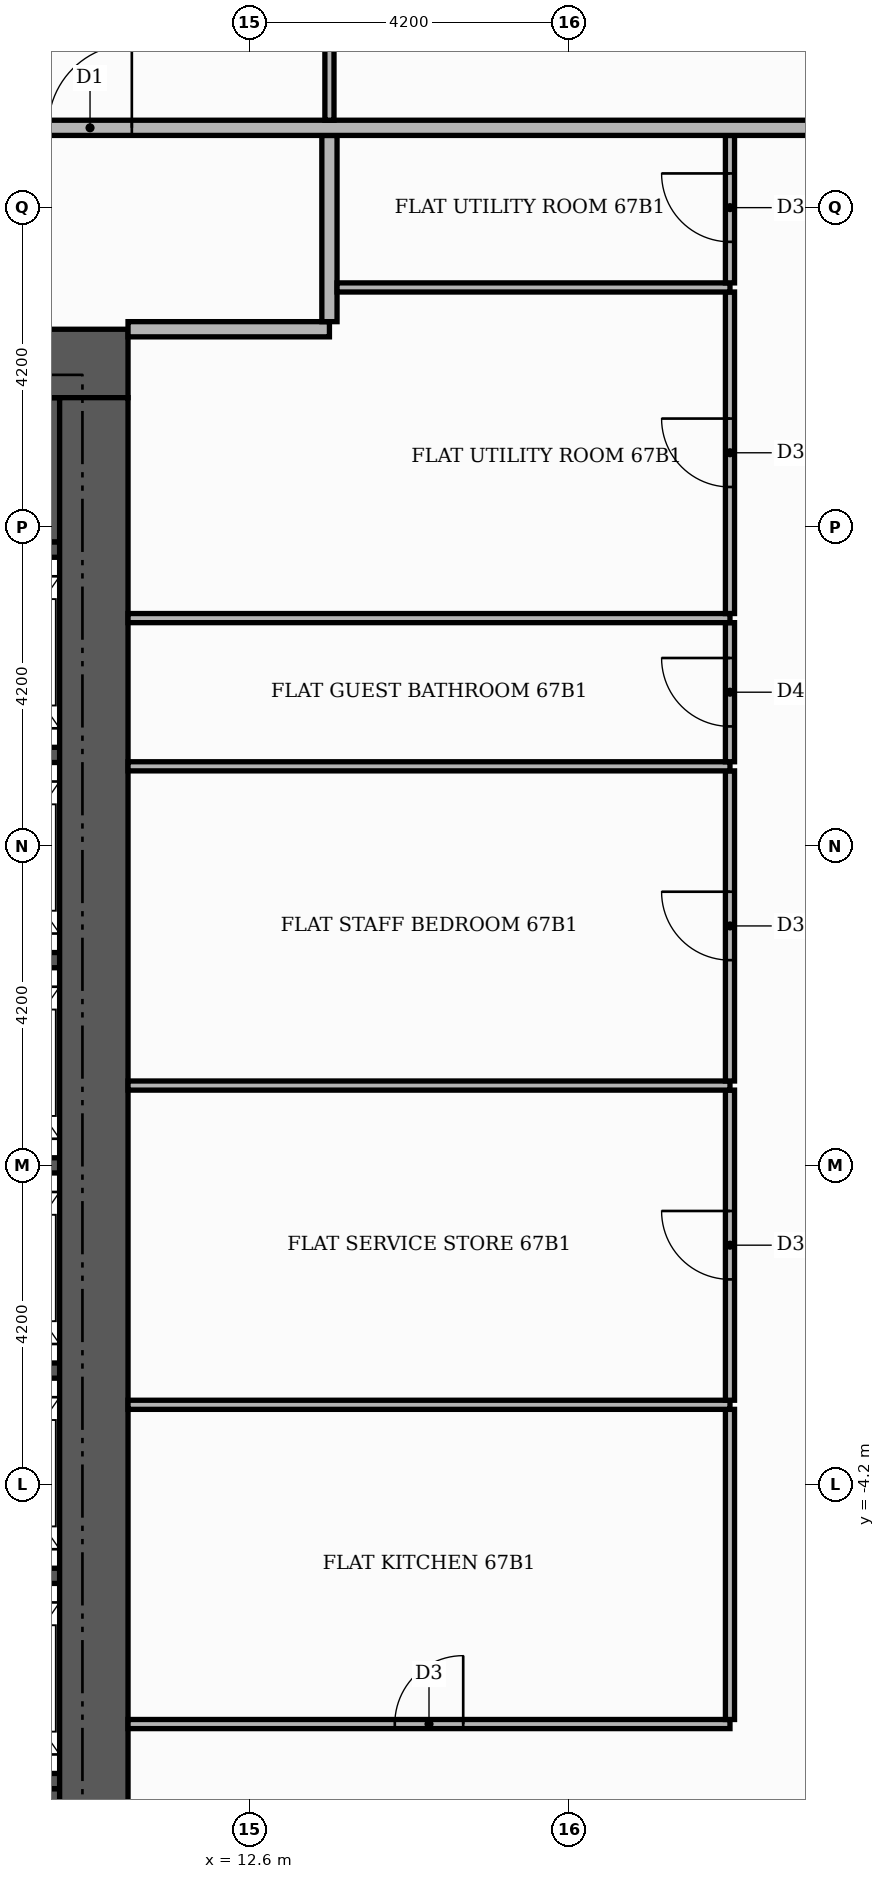
"""IFC4 building model, lengths in metres.
Left out: names, types, materials, properties, quantities, classifications, styles, units other than length and angle.
Written with IfcOpenShell. Run it as: python <this file> out.ifc"""

import sys

from ifc_helpers import new_model, si_unit, direction, frame, frame_2d, origin, place, context, subcontext, project, spatial, rectangle, extrude, element, fill, save


model = new_model("IFC4")
c1 = context("Model", 3, precision=1e-05, world=origin(), true_north=direction((0.0, 1.0)))
c2 = subcontext(c1, "Body", "Model", "MODEL_VIEW")
j1 = project(units=[si_unit("LENGTHUNIT", "METRE"), si_unit("PLANEANGLEUNIT", "RADIAN")], contexts=[c1])
p1 = place(None, origin())
s1 = spatial("IfcSite", under=j1, at=p1, CompositionType="ELEMENT")
p2 = place(p1, origin())
s2 = spatial("IfcBuilding", under=s1, at=p2, CompositionType="ELEMENT")
p3 = place(p2, frame((0.0, 0.0, 279.6)))
s3 = spatial("IfcBuildingStorey", under=s2, at=p3, CompositionType="ELEMENT", Elevation=279.6)
for number, where, z_axis, x_axis in (
    (1, (5.5, -9.15, 0.0), (0.0, 0.0, 1.0), (1.0, 0.0, 0.0)),
    (2, (5.5, 9.15, 0.0), (0.0, 0.0, 1.0), (1.0, 0.0, 0.0)),
):
    element("IfcWall", number, at=place(p3, frame(where, z_axis=z_axis, x_axis=x_axis)), inside=s3, PredefinedType="SHEAR", context=c2, shape_type="SweptSolid", body=[
        extrude(rectangle(XDim=4.6, YDim=1.9, at=frame_2d((2.3, 0.0))), origin(), (0.0, 0.0, 1.0), 3.48),
    ])
for number, where, z_axis, x_axis in (
    (3, (8.1, -8.1, 0.0), (0.0, 0.0, 1.0), (1.0, 0.0, 0.0)),
    (4, (8.1, -5.4, 0.0), (0.0, 0.0, 1.0), (1.0, 0.0, 0.0)),
    (5, (8.1, -2.7, 0.0), (0.0, 0.0, 1.0), (1.0, 0.0, 0.0)),
    (6, (8.1, 0.0, 0.0), (0.0, 0.0, 1.0), (1.0, 0.0, 0.0)),
    (7, (8.1, 2.7, 0.0), (0.0, 0.0, 1.0), (1.0, 0.0, 0.0)),
    (8, (8.1, 5.4, 0.0), (0.0, 0.0, 1.0), (1.0, 0.0, 0.0)),
    (9, (8.1, 8.1, 0.0), (0.0, 0.0, 1.0), (1.0, 0.0, 0.0)),
):
    element("IfcWall", number, at=place(p3, frame(where, z_axis=z_axis, x_axis=x_axis)), inside=s3, PredefinedType="SHEAR", context=c2, shape_type="SweptSolid", body=[
        extrude(rectangle(XDim=2.0, YDim=0.2, at=frame_2d((1.0, 0.0))), origin(), (0.0, 0.0, 1.0), 3.48),
    ])
p4 = place(p3, frame((-11.0, 10.55, 0.0), z_axis=(0.0, 0.0, 1.0), x_axis=(1.0, 0.0, 0.0)))
e10 = element("IfcWall", 10, at=p4, inside=s3, PredefinedType="SHEAR", context=c2, shape_type="SweptSolid", body=[
    extrude(rectangle(XDim=22.0, YDim=0.9, at=frame_2d((11.0, 0.0))), origin(), (0.0, 0.0, 1.0), 3.48),
])
p5 = place(p4, frame((13.3, 0.0, 0.0)))
e11 = element("IfcOpeningElement", 11, at=p5, cuts=e10, PredefinedType="OPENING", context=c2, shape_type="SweptSolid", body=[
    extrude(rectangle(XDim=1.8, YDim=2.2, at=frame_2d((0.9, 1.1))), frame((0.0, 0.46, 0.0), z_axis=(0.0, -1.0, 0.0), x_axis=(1.0, 0.0, 0.0)), (0.0, 0.0, 1.0), 0.92),
])
p6 = place(p3, frame((10.55, -10.1, 0.0), z_axis=(0.0, 0.0, 1.0), x_axis=(0.0, 1.0, 0.0)))
e12 = element("IfcWall", 12, at=p6, inside=s3, PredefinedType="SHEAR", context=c2, shape_type="SweptSolid", body=[
    extrude(rectangle(XDim=20.2, YDim=0.9, at=frame_2d((10.1, 0.0))), origin(), (0.0, 0.0, 1.0), 3.48),
])
p7 = place(p3, frame((11.0, -7.35, 0.0), z_axis=(0.0, 0.0, 1.0), x_axis=(1.0, 0.0, 0.0)))
e13 = element("IfcWall", 13, at=p7, inside=s3, PredefinedType="PARTITIONING", context=c2, shape_type="SweptSolid", body=[
    extrude(rectangle(XDim=7.92, YDim=0.12, at=frame_2d((3.96, 0.0))), origin(), (0.0, 0.0, 1.0), 3.48),
])
p8 = place(p7, frame((3.51, 0.0, 0.0)))
e14 = element("IfcOpeningElement", 14, at=p8, cuts=e13, PredefinedType="OPENING", context=c2, shape_type="SweptSolid", body=[
    extrude(rectangle(XDim=0.9, YDim=2.1, at=frame_2d((0.45, 1.05))), frame((0.0, 0.07, 0.0), z_axis=(0.0, -1.0, 0.0), x_axis=(1.0, 0.0, 0.0)), (0.0, 0.0, 1.0), 0.14),
])
p9 = place(p3, frame((18.92, -7.29, 0.0), z_axis=(0.0, 0.0, 1.0), x_axis=(0.0, 1.0, 0.0)))
e15 = element("IfcWall", 15, at=p9, inside=s3, PredefinedType="PARTITIONING", context=c2, shape_type="SweptSolid", body=[
    extrude(rectangle(XDim=4.08, YDim=0.12, at=frame_2d((2.04, 0.0))), origin(), (0.0, 0.0, 1.0), 3.48),
])
p10 = place(p3, frame((11.0, -3.15, 0.0), z_axis=(0.0, 0.0, 1.0), x_axis=(1.0, 0.0, 0.0)))
e16 = element("IfcWall", 16, at=p10, inside=s3, PredefinedType="PARTITIONING", context=c2, shape_type="SweptSolid", body=[
    extrude(rectangle(XDim=7.92, YDim=0.12, at=frame_2d((3.96, 0.0))), origin(), (0.0, 0.0, 1.0), 3.48),
])
p11 = place(p3, frame((18.92, -3.09, 0.0), z_axis=(0.0, 0.0, 1.0), x_axis=(0.0, 1.0, 0.0)))
e17 = element("IfcWall", 17, at=p11, inside=s3, PredefinedType="PARTITIONING", context=c2, shape_type="SweptSolid", body=[
    extrude(rectangle(XDim=4.08, YDim=0.12, at=frame_2d((2.04, 0.0))), origin(), (0.0, 0.0, 1.0), 3.48),
])
p12 = place(p11, frame((1.59, 0.0, 0.0)))
e18 = element("IfcOpeningElement", 18, at=p12, cuts=e17, PredefinedType="OPENING", context=c2, shape_type="SweptSolid", body=[
    extrude(rectangle(XDim=0.9, YDim=2.1, at=frame_2d((0.45, 1.05))), frame((0.0, 0.07, 0.0), z_axis=(0.0, -1.0, 0.0), x_axis=(1.0, 0.0, 0.0)), (0.0, 0.0, 1.0), 0.14),
])
p13 = place(p3, frame((11.0, 1.05, 0.0), z_axis=(0.0, 0.0, 1.0), x_axis=(1.0, 0.0, 0.0)))
e19 = element("IfcWall", 19, at=p13, inside=s3, PredefinedType="PARTITIONING", context=c2, shape_type="SweptSolid", body=[
    extrude(rectangle(XDim=7.92, YDim=0.12, at=frame_2d((3.96, 0.0))), origin(), (0.0, 0.0, 1.0), 3.48),
])
p14 = place(p3, frame((18.92, 1.11, 0.0), z_axis=(0.0, 0.0, 1.0), x_axis=(0.0, 1.0, 0.0)))
e20 = element("IfcWall", 20, at=p14, inside=s3, PredefinedType="PARTITIONING", context=c2, shape_type="SweptSolid", body=[
    extrude(rectangle(XDim=4.08, YDim=0.12, at=frame_2d((2.04, 0.0))), origin(), (0.0, 0.0, 1.0), 3.48),
])
p15 = place(p14, frame((1.59, 0.0, 0.0)))
e21 = element("IfcOpeningElement", 21, at=p15, cuts=e20, PredefinedType="OPENING", context=c2, shape_type="SweptSolid", body=[
    extrude(rectangle(XDim=0.9, YDim=2.1, at=frame_2d((0.45, 1.05))), frame((0.0, 0.07, 0.0), z_axis=(0.0, -1.0, 0.0), x_axis=(1.0, 0.0, 0.0)), (0.0, 0.0, 1.0), 0.14),
])
p16 = place(p3, frame((11.0, 5.25, 0.0), z_axis=(0.0, 0.0, 1.0), x_axis=(1.0, 0.0, 0.0)))
e22 = element("IfcWall", 22, at=p16, inside=s3, PredefinedType="PARTITIONING", context=c2, shape_type="SweptSolid", body=[
    extrude(rectangle(XDim=7.92, YDim=0.12, at=frame_2d((3.96, 0.0))), origin(), (0.0, 0.0, 1.0), 3.48),
])
p17 = place(p3, frame((18.92, 5.31, 0.0), z_axis=(0.0, 0.0, 1.0), x_axis=(0.0, 1.0, 0.0)))
e23 = element("IfcWall", 23, at=p17, inside=s3, PredefinedType="PARTITIONING", context=c2, shape_type="SweptSolid", body=[
    extrude(rectangle(XDim=1.83, YDim=0.12, at=frame_2d((0.915, 0.0))), origin(), (0.0, 0.0, 1.0), 3.48),
])
p18 = place(p17, frame((0.465, 0.0, 0.0)))
e24 = element("IfcOpeningElement", 24, at=p18, cuts=e23, PredefinedType="OPENING", context=c2, shape_type="SweptSolid", body=[
    extrude(rectangle(XDim=0.9, YDim=2.1, at=frame_2d((0.45, 1.05))), frame((0.0, 0.07, 0.0), z_axis=(0.0, -1.0, 0.0), x_axis=(1.0, 0.0, 0.0)), (0.0, 0.0, 1.0), 0.14),
])
p19 = place(p3, frame((11.0, 7.2, 0.0), z_axis=(0.0, 0.0, 1.0), x_axis=(1.0, 0.0, 0.0)))
e25 = element("IfcWall", 25, at=p19, inside=s3, PredefinedType="PARTITIONING", context=c2, shape_type="SweptSolid", body=[
    extrude(rectangle(XDim=7.92, YDim=0.12, at=frame_2d((3.96, 0.0))), origin(), (0.0, 0.0, 1.0), 3.48),
])
p20 = place(p3, frame((18.92, 7.26, 0.0), z_axis=(0.0, 0.0, 1.0), x_axis=(0.0, 1.0, 0.0)))
e26 = element("IfcWall", 26, at=p20, inside=s3, PredefinedType="PARTITIONING", context=c2, shape_type="SweptSolid", body=[
    extrude(rectangle(XDim=4.23, YDim=0.12, at=frame_2d((2.115, 0.0))), origin(), (0.0, 0.0, 1.0), 3.48),
])
p21 = place(p20, frame((1.665, 0.0, 0.0)))
e27 = element("IfcOpeningElement", 27, at=p21, cuts=e26, PredefinedType="OPENING", context=c2, shape_type="SweptSolid", body=[
    extrude(rectangle(XDim=0.9, YDim=2.1, at=frame_2d((0.45, 1.05))), frame((0.0, 0.07, 0.0), z_axis=(0.0, -1.0, 0.0), x_axis=(1.0, 0.0, 0.0)), (0.0, 0.0, 1.0), 0.14),
])
p22 = place(p3, frame((11.0, 11.0, 0.0), z_axis=(0.0, 0.0, 1.0), x_axis=(1.0, 0.0, 0.0)))
e28 = element("IfcWall", 28, at=p22, inside=s3, PredefinedType="PARTITIONING", context=c2, shape_type="SweptSolid", body=[
    extrude(rectangle(XDim=2.65, YDim=0.2, at=frame_2d((1.325, 0.0))), origin(), (0.0, 0.0, 1.0), 3.48),
])
p23 = place(p3, frame((13.65, 11.1, 0.0), z_axis=(0.0, 0.0, 1.0), x_axis=(0.0, 1.0, 0.0)))
e29 = element("IfcWall", 29, at=p23, inside=s3, PredefinedType="PARTITIONING", context=c2, shape_type="SweptSolid", body=[
    extrude(rectangle(XDim=2.45, YDim=0.2, at=frame_2d((1.225, 0.0))), origin(), (0.0, 0.0, 1.0), 3.48),
])
p24 = place(p3, frame((13.75, 11.55, 0.0), z_axis=(0.0, 0.0, 1.0), x_axis=(1.0, 0.0, 0.0)))
e30 = element("IfcWall", 30, at=p24, inside=s3, PredefinedType="PARTITIONING", context=c2, shape_type="SweptSolid", body=[
    extrude(rectangle(XDim=5.17, YDim=0.12, at=frame_2d((2.585, 0.0))), origin(), (0.0, 0.0, 1.0), 3.48),
])
p25 = place(p3, frame((18.92, 11.61, 0.0), z_axis=(0.0, 0.0, 1.0), x_axis=(0.0, 1.0, 0.0)))
e31 = element("IfcWall", 31, at=p25, inside=s3, PredefinedType="PARTITIONING", context=c2, shape_type="SweptSolid", body=[
    extrude(rectangle(XDim=1.94, YDim=0.12, at=frame_2d((0.97, 0.0))), origin(), (0.0, 0.0, 1.0), 3.48),
])
p26 = place(p25, frame((0.54, 0.0, 0.0)))
e32 = element("IfcOpeningElement", 32, at=p26, cuts=e31, PredefinedType="OPENING", context=c2, shape_type="SweptSolid", body=[
    extrude(rectangle(XDim=0.9, YDim=2.1, at=frame_2d((0.45, 1.05))), frame((0.0, 0.07, 0.0), z_axis=(0.0, -1.0, 0.0), x_axis=(1.0, 0.0, 0.0)), (0.0, 0.0, 1.0), 0.14),
])
p27 = place(p3, frame((-13.65, 13.65, 0.0), z_axis=(0.0, 0.0, 1.0), x_axis=(1.0, 0.0, 0.0)))
e33 = element("IfcWall", 33, at=p27, inside=s3, PredefinedType="PARTITIONING", context=c2, shape_type="SweptSolid", body=[
    extrude(rectangle(XDim=39.07, YDim=0.2, at=frame_2d((19.535, 0.0))), origin(), (0.0, 0.0, 1.0), 3.48),
])
p28 = place(p27, frame((23.6, 0.0, 0.0)))
e34 = element("IfcOpeningElement", 34, at=p28, cuts=e33, PredefinedType="OPENING", context=c2, shape_type="SweptSolid", body=[
    extrude(rectangle(XDim=1.1, YDim=2.4, at=frame_2d((0.55, 1.2))), frame((0.0, 0.11, 0.0), z_axis=(0.0, -1.0, 0.0), x_axis=(1.0, 0.0, 0.0)), (0.0, 0.0, 1.0), 0.22),
])
p29 = place(p3, frame((13.65, 13.75, 0.0), z_axis=(0.0, 0.0, 1.0), x_axis=(0.0, 1.0, 0.0)))
e35 = element("IfcWall", 35, at=p29, inside=s3, PredefinedType="PARTITIONING", context=c2, shape_type="SweptSolid", body=[
    extrude(rectangle(XDim=6.31, YDim=0.12, at=frame_2d((3.155, 0.0))), origin(), (0.0, 0.0, 1.0), 3.48),
])
p30 = place(p29, frame((2.685, 0.0, 0.0)))
e36 = element("IfcOpeningElement", 36, at=p30, cuts=e35, PredefinedType="OPENING", context=c2, shape_type="SweptSolid", body=[
    extrude(rectangle(XDim=0.9, YDim=2.1, at=frame_2d((0.45, 1.05))), frame((0.0, 0.07, 0.0), z_axis=(0.0, -1.0, 0.0), x_axis=(1.0, 0.0, 0.0)), (0.0, 0.0, 1.0), 0.14),
])
p31 = place(p8, origin())
e37 = element("IfcDoor", 37, at=p31, inside=s3, OperationType="SINGLE_SWING_RIGHT", PredefinedType="DOOR", context=c2, shape_type="SweptSolid", body=[
    extrude(rectangle(XDim=0.9, YDim=2.1, at=frame_2d((0.45, 1.05))), frame((0.0, 0.025, 0.0), z_axis=(0.0, -1.0, 0.0), x_axis=(1.0, 0.0, 0.0)), (0.0, 0.0, 1.0), 0.05),
])
fill(e14, e37)
p32 = place(p12, origin())
e38 = element("IfcDoor", 38, at=p32, inside=s3, OperationType="SINGLE_SWING_RIGHT", PredefinedType="DOOR", context=c2, shape_type="SweptSolid", body=[
    extrude(rectangle(XDim=0.9, YDim=2.1, at=frame_2d((0.45, 1.05))), frame((0.0, 0.025, 0.0), z_axis=(0.0, -1.0, 0.0), x_axis=(1.0, 0.0, 0.0)), (0.0, 0.0, 1.0), 0.05),
])
fill(e18, e38)
p33 = place(p15, origin())
e39 = element("IfcDoor", 39, at=p33, inside=s3, OperationType="SINGLE_SWING_RIGHT", PredefinedType="DOOR", context=c2, shape_type="SweptSolid", body=[
    extrude(rectangle(XDim=0.9, YDim=2.1, at=frame_2d((0.45, 1.05))), frame((0.0, 0.025, 0.0), z_axis=(0.0, -1.0, 0.0), x_axis=(1.0, 0.0, 0.0)), (0.0, 0.0, 1.0), 0.05),
])
fill(e21, e39)
p34 = place(p18, origin())
e40 = element("IfcDoor", 40, at=p34, inside=s3, OperationType="SINGLE_SWING_RIGHT", PredefinedType="DOOR", context=c2, shape_type="SweptSolid", body=[
    extrude(rectangle(XDim=0.9, YDim=2.1, at=frame_2d((0.45, 1.05))), frame((0.0, 0.025, 0.0), z_axis=(0.0, -1.0, 0.0), x_axis=(1.0, 0.0, 0.0)), (0.0, 0.0, 1.0), 0.05),
])
fill(e24, e40)
p35 = place(p21, origin())
e41 = element("IfcDoor", 41, at=p35, inside=s3, OperationType="SINGLE_SWING_RIGHT", PredefinedType="DOOR", context=c2, shape_type="SweptSolid", body=[
    extrude(rectangle(XDim=0.9, YDim=2.1, at=frame_2d((0.45, 1.05))), frame((0.0, 0.025, 0.0), z_axis=(0.0, -1.0, 0.0), x_axis=(1.0, 0.0, 0.0)), (0.0, 0.0, 1.0), 0.05),
])
fill(e27, e41)
p36 = place(p26, origin())
e42 = element("IfcDoor", 42, at=p36, inside=s3, OperationType="SINGLE_SWING_RIGHT", PredefinedType="DOOR", context=c2, shape_type="SweptSolid", body=[
    extrude(rectangle(XDim=0.9, YDim=2.1, at=frame_2d((0.45, 1.05))), frame((0.0, 0.025, 0.0), z_axis=(0.0, -1.0, 0.0), x_axis=(1.0, 0.0, 0.0)), (0.0, 0.0, 1.0), 0.05),
])
fill(e32, e42)
p37 = place(p28, origin())
e43 = element("IfcDoor", 43, at=p37, inside=s3, OperationType="SINGLE_SWING_RIGHT", PredefinedType="DOOR", context=c2, shape_type="SweptSolid", body=[
    extrude(rectangle(XDim=1.1, YDim=2.4, at=frame_2d((0.55, 1.2))), frame((0.0, 0.025, 0.0), z_axis=(0.0, -1.0, 0.0), x_axis=(1.0, 0.0, 0.0)), (0.0, 0.0, 1.0), 0.05),
])
fill(e34, e43)
save(model, sys.argv[1])
